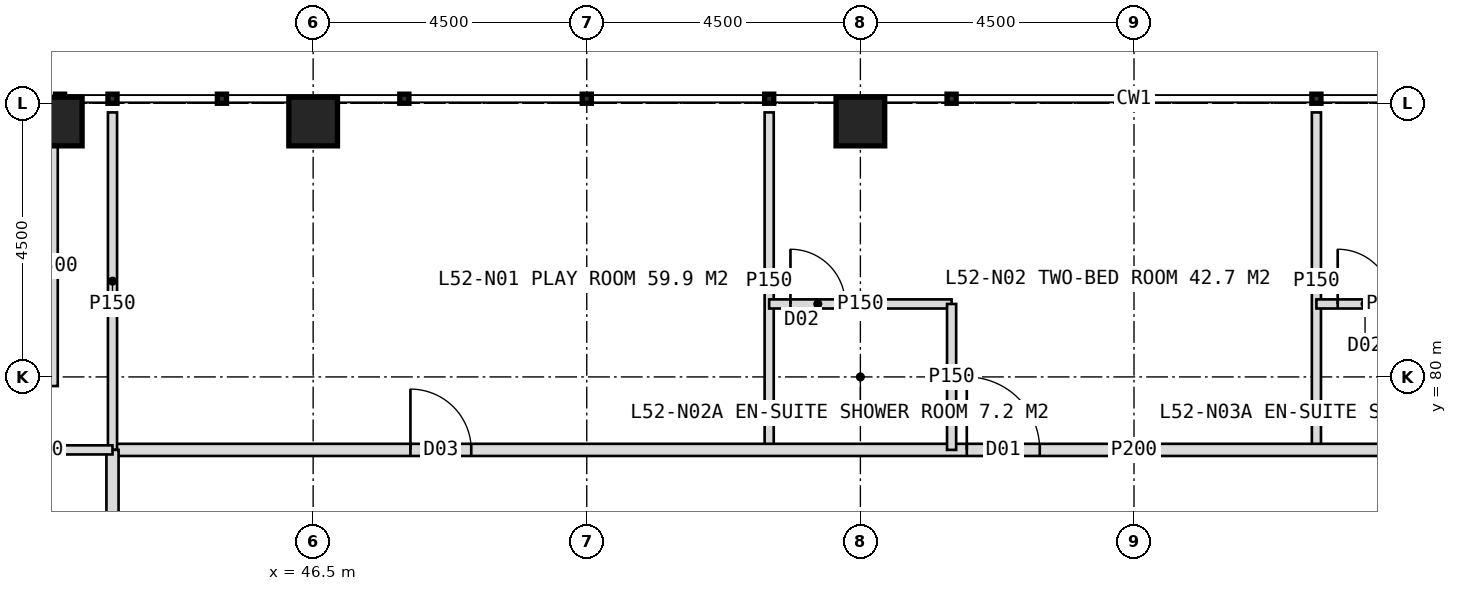
"""IFC4 building model, lengths in metres.
Left out: names, types, materials, properties, quantities, classifications, styles, units other than length and angle.
Written with IfcOpenShell. Run it as: python <this file> out.ifc"""

import sys

from ifc_helpers import new_model, si_unit, direction, frame, frame_2d, origin, origin_2d, place, context, subcontext, project, spatial, rectangle, hollow_rectangle, extrude, element, fill, save


model = new_model("IFC4")
c1 = context("Model", 3, precision=1e-05, world=origin(), true_north=direction((0.0, 1.0)))
c2 = subcontext(c1, "Body", "Model", "MODEL_VIEW")
j1 = project(units=[si_unit("LENGTHUNIT", "METRE"), si_unit("PLANEANGLEUNIT", "RADIAN")], contexts=[c1])
p1 = place(None, origin())
s1 = spatial("IfcSite", under=j1, at=p1, CompositionType="ELEMENT")
p2 = place(p1, origin())
s2 = spatial("IfcBuilding", under=s1, at=p2, CompositionType="ELEMENT")
p3 = place(p2, frame((0.0, 0.0, 217.0)))
s3 = spatial("IfcBuildingStorey", under=s2, at=p3, CompositionType="ELEMENT", Elevation=217.0)
for number, where, z_axis, x_axis in (
    (1, (42.3, 84.2, 0.0), (0.0, 0.0, 1.0), (1.0, 0.0, 0.0)),
    (2, (46.5, 84.2, 0.0), (0.0, 0.0, 1.0), (1.0, 0.0, 0.0)),
    (3, (55.5, 84.2, 0.0), (0.0, 0.0, 1.0), (1.0, 0.0, 0.0)),
):
    element("IfcColumn", number, at=place(p3, frame(where, z_axis=z_axis, x_axis=x_axis)), inside=s3, PredefinedType="COLUMN", context=c2, shape_type="SweptSolid", body=[
        extrude(hollow_rectangle(XDim=0.8, YDim=0.8, WallThickness=0.08, at=origin_2d()), origin(), (0.0, 0.0, 1.0), 4.0),
    ])
p4 = place(p3, frame((42.15, 79.85, 0.0), z_axis=(0.0, 0.0, 1.0), x_axis=(0.0, 1.0, 0.0)))
e4 = element("IfcWall", 4, at=p4, inside=s3, PredefinedType="ELEMENTEDWALL", context=c2, shape_type="SweptSolid", body=[
    extrude(rectangle(XDim=3.95, YDim=0.3, at=frame_2d((1.975, 0.0))), origin(), (0.0, 0.0, 1.0), 2.85),
])
for number, where, z_axis, x_axis in (
    (5, (54.0, 78.8, 0.0), (0.0, 0.0, 1.0), (0.0, 1.0, 0.0)),
    (6, (63.0, 78.8, 0.0), (0.0, 0.0, 1.0), (0.0, 1.0, 0.0)),
):
    element("IfcWall", number, at=place(p3, frame(where, z_axis=z_axis, x_axis=x_axis)), inside=s3, PredefinedType="PARTITIONING", context=c2, shape_type="SweptSolid", body=[
        extrude(rectangle(XDim=5.55, YDim=0.15, at=frame_2d((2.775, 0.0))), origin(), (0.0, 0.0, 1.0), 3.75),
    ])
p5 = place(p3, frame((43.2, 78.8, 0.0), z_axis=(0.0, 0.0, 1.0), x_axis=(1.0, 0.0, 0.0)))
e7 = element("IfcWall", 7, at=p5, inside=s3, PredefinedType="PARTITIONING", context=c2, shape_type="SweptSolid", body=[
    extrude(rectangle(XDim=33.6, YDim=0.2, at=frame_2d((16.8, 0.0))), origin(), (0.0, 0.0, 1.0), 3.75),
])
p6 = place(p5, frame((4.9, 0.0, 0.0)))
e8 = element("IfcOpeningElement", 8, at=p6, cuts=e7, PredefinedType="OPENING", context=c2, shape_type="SweptSolid", body=[
    extrude(rectangle(XDim=1.0, YDim=2.1, at=frame_2d((0.5, 1.05))), frame((0.0, 0.11, 0.0), z_axis=(0.0, -1.0, 0.0), x_axis=(1.0, 0.0, 0.0)), (0.0, 0.0, 1.0), 0.22),
])
p7 = place(p5, frame((14.05, 0.0, 0.0)))
e9 = element("IfcOpeningElement", 9, at=p7, cuts=e7, PredefinedType="OPENING", context=c2, shape_type="SweptSolid", body=[
    extrude(rectangle(XDim=1.2, YDim=2.2, at=frame_2d((0.6, 1.1))), frame((0.0, 0.11, 0.0), z_axis=(0.0, -1.0, 0.0), x_axis=(1.0, 0.0, 0.0)), (0.0, 0.0, 1.0), 0.22),
])
p8 = place(p5, frame((22.45, 0.0, 0.0)))
e10 = element("IfcOpeningElement", 10, at=p8, cuts=e7, PredefinedType="OPENING", context=c2, shape_type="SweptSolid", body=[
    extrude(rectangle(XDim=1.2, YDim=2.2, at=frame_2d((0.6, 1.1))), frame((0.0, 0.11, 0.0), z_axis=(0.0, -1.0, 0.0), x_axis=(1.0, 0.0, 0.0)), (0.0, 0.0, 1.0), 0.22),
])
p9 = place(p3, frame((43.2, 78.8, 0.0), z_axis=(0.0, 0.0, 1.0), x_axis=(0.0, 1.0, 0.0)))
e11 = element("IfcWall", 11, at=p9, inside=s3, PredefinedType="PARTITIONING", context=c2, shape_type="SweptSolid", body=[
    extrude(rectangle(XDim=5.55, YDim=0.15, at=frame_2d((2.775, 0.0))), origin(), (0.0, 0.0, 1.0), 3.75),
])
p10 = place(p3, frame((54.0, 81.2, 0.0), z_axis=(0.0, 0.0, 1.0), x_axis=(1.0, 0.0, 0.0)))
e12 = element("IfcWall", 12, at=p10, inside=s3, PredefinedType="PARTITIONING", context=c2, shape_type="SweptSolid", body=[
    extrude(rectangle(XDim=3.0, YDim=0.15, at=frame_2d((1.5, 0.0))), origin(), (0.0, 0.0, 1.0), 3.75),
])
p11 = place(p10, frame((0.35, 0.0, 0.0)))
e13 = element("IfcOpeningElement", 13, at=p11, cuts=e12, PredefinedType="OPENING", context=c2, shape_type="SweptSolid", body=[
    extrude(rectangle(XDim=0.9, YDim=2.1, at=frame_2d((0.45, 1.05))), frame((0.0, 0.085, 0.0), z_axis=(0.0, -1.0, 0.0), x_axis=(1.0, 0.0, 0.0)), (0.0, 0.0, 1.0), 0.17),
])
p12 = place(p3, frame((57.0, 78.8, 0.0), z_axis=(0.0, 0.0, 1.0), x_axis=(0.0, 1.0, 0.0)))
e14 = element("IfcWall", 14, at=p12, inside=s3, PredefinedType="PARTITIONING", context=c2, shape_type="SweptSolid", body=[
    extrude(rectangle(XDim=2.4, YDim=0.15, at=frame_2d((1.2, 0.0))), origin(), (0.0, 0.0, 1.0), 3.75),
])
p13 = place(p3, frame((63.0, 81.2, 0.0), z_axis=(0.0, 0.0, 1.0), x_axis=(1.0, 0.0, 0.0)))
e15 = element("IfcWall", 15, at=p13, inside=s3, PredefinedType="PARTITIONING", context=c2, shape_type="SweptSolid", body=[
    extrude(rectangle(XDim=2.4, YDim=0.15, at=frame_2d((1.2, 0.0))), origin(), (0.0, 0.0, 1.0), 3.75),
])
p14 = place(p13, frame((0.35, 0.0, 0.0)))
e16 = element("IfcOpeningElement", 16, at=p14, cuts=e15, PredefinedType="OPENING", context=c2, shape_type="SweptSolid", body=[
    extrude(rectangle(XDim=0.9, YDim=2.1, at=frame_2d((0.45, 1.05))), frame((0.0, 0.085, 0.0), z_axis=(0.0, -1.0, 0.0), x_axis=(1.0, 0.0, 0.0)), (0.0, 0.0, 1.0), 0.17),
])
p15 = place(p3, frame((43.2, 45.2, 0.0), z_axis=(0.0, 0.0, 1.0), x_axis=(0.0, 1.0, 0.0)))
e17 = element("IfcWall", 17, at=p15, inside=s3, PredefinedType="PARTITIONING", context=c2, shape_type="SweptSolid", body=[
    extrude(rectangle(XDim=33.6, YDim=0.2, at=frame_2d((16.8, 0.0))), origin(), (0.0, 0.0, 1.0), 3.75),
])
p16 = place(p15, frame((3.25, 0.0, 0.0)))
e18 = element("IfcOpeningElement", 18, at=p16, cuts=e17, PredefinedType="OPENING", context=c2, shape_type="SweptSolid", body=[
    extrude(rectangle(XDim=1.2, YDim=2.2, at=frame_2d((0.6, 1.1))), frame((0.0, 0.11, 0.0), z_axis=(0.0, -1.0, 0.0), x_axis=(1.0, 0.0, 0.0)), (0.0, 0.0, 1.0), 0.22),
])
p17 = place(p15, frame((11.05, 0.0, 0.0)))
e19 = element("IfcOpeningElement", 19, at=p17, cuts=e17, PredefinedType="OPENING", context=c2, shape_type="SweptSolid", body=[
    extrude(rectangle(XDim=1.2, YDim=2.2, at=frame_2d((0.6, 1.1))), frame((0.0, 0.11, 0.0), z_axis=(0.0, -1.0, 0.0), x_axis=(1.0, 0.0, 0.0)), (0.0, 0.0, 1.0), 0.22),
])
p18 = place(p15, frame((20.05, 0.0, 0.0)))
e20 = element("IfcOpeningElement", 20, at=p18, cuts=e17, PredefinedType="OPENING", context=c2, shape_type="SweptSolid", body=[
    extrude(rectangle(XDim=1.2, YDim=2.2, at=frame_2d((0.6, 1.1))), frame((0.0, 0.11, 0.0), z_axis=(0.0, -1.0, 0.0), x_axis=(1.0, 0.0, 0.0)), (0.0, 0.0, 1.0), 0.22),
])
p19 = place(p15, frame((26.95, 0.0, 0.0)))
e21 = element("IfcOpeningElement", 21, at=p19, cuts=e17, PredefinedType="OPENING", context=c2, shape_type="SweptSolid", body=[
    extrude(rectangle(XDim=1.2, YDim=2.2, at=frame_2d((0.6, 1.1))), frame((0.0, 0.11, 0.0), z_axis=(0.0, -1.0, 0.0), x_axis=(1.0, 0.0, 0.0)), (0.0, 0.0, 1.0), 0.22),
])
p20 = place(p3, frame((43.2, 78.8, 0.0), z_axis=(0.0, 0.0, 1.0), x_axis=(-1.0, 0.0, 0.0)))
e22 = element("IfcWall", 22, at=p20, inside=s3, PredefinedType="PARTITIONING", context=c2, shape_type="SweptSolid", body=[
    extrude(rectangle(XDim=2.4, YDim=0.15, at=frame_2d((1.2, 0.0))), origin(), (0.0, 0.0, 1.0), 3.75),
])
p21 = place(p6, origin())
e23 = element("IfcDoor", 23, at=p21, inside=s3, OperationType="SINGLE_SWING_LEFT", PredefinedType="DOOR", context=c2, shape_type="SweptSolid", body=[
    extrude(rectangle(XDim=1.0, YDim=2.1, at=frame_2d((0.5, 1.05))), frame((0.0, 0.025, 0.0), z_axis=(0.0, -1.0, 0.0), x_axis=(1.0, 0.0, 0.0)), (0.0, 0.0, 1.0), 0.05),
])
fill(e8, e23)
p22 = place(p7, origin())
e24 = element("IfcDoor", 24, at=p22, inside=s3, OperationType="SINGLE_SWING_LEFT", PredefinedType="DOOR", context=c2, shape_type="SweptSolid", body=[
    extrude(rectangle(XDim=1.2, YDim=2.2, at=frame_2d((0.6, 1.1))), frame((0.0, 0.025, 0.0), z_axis=(0.0, -1.0, 0.0), x_axis=(1.0, 0.0, 0.0)), (0.0, 0.0, 1.0), 0.05),
])
fill(e9, e24)
p23 = place(p11, origin())
e25 = element("IfcDoor", 25, at=p23, inside=s3, OperationType="SINGLE_SWING_LEFT", PredefinedType="DOOR", context=c2, shape_type="SweptSolid", body=[
    extrude(rectangle(XDim=0.9, YDim=2.1, at=frame_2d((0.45, 1.05))), frame((0.0, 0.025, 0.0), z_axis=(0.0, -1.0, 0.0), x_axis=(1.0, 0.0, 0.0)), (0.0, 0.0, 1.0), 0.05),
])
fill(e13, e25)
p24 = place(p14, origin())
e26 = element("IfcDoor", 26, at=p24, inside=s3, OperationType="SINGLE_SWING_LEFT", PredefinedType="DOOR", context=c2, shape_type="SweptSolid", body=[
    extrude(rectangle(XDim=0.9, YDim=2.1, at=frame_2d((0.45, 1.05))), frame((0.0, 0.025, 0.0), z_axis=(0.0, -1.0, 0.0), x_axis=(1.0, 0.0, 0.0)), (0.0, 0.0, 1.0), 0.05),
])
fill(e16, e26)
save(model, sys.argv[1])
